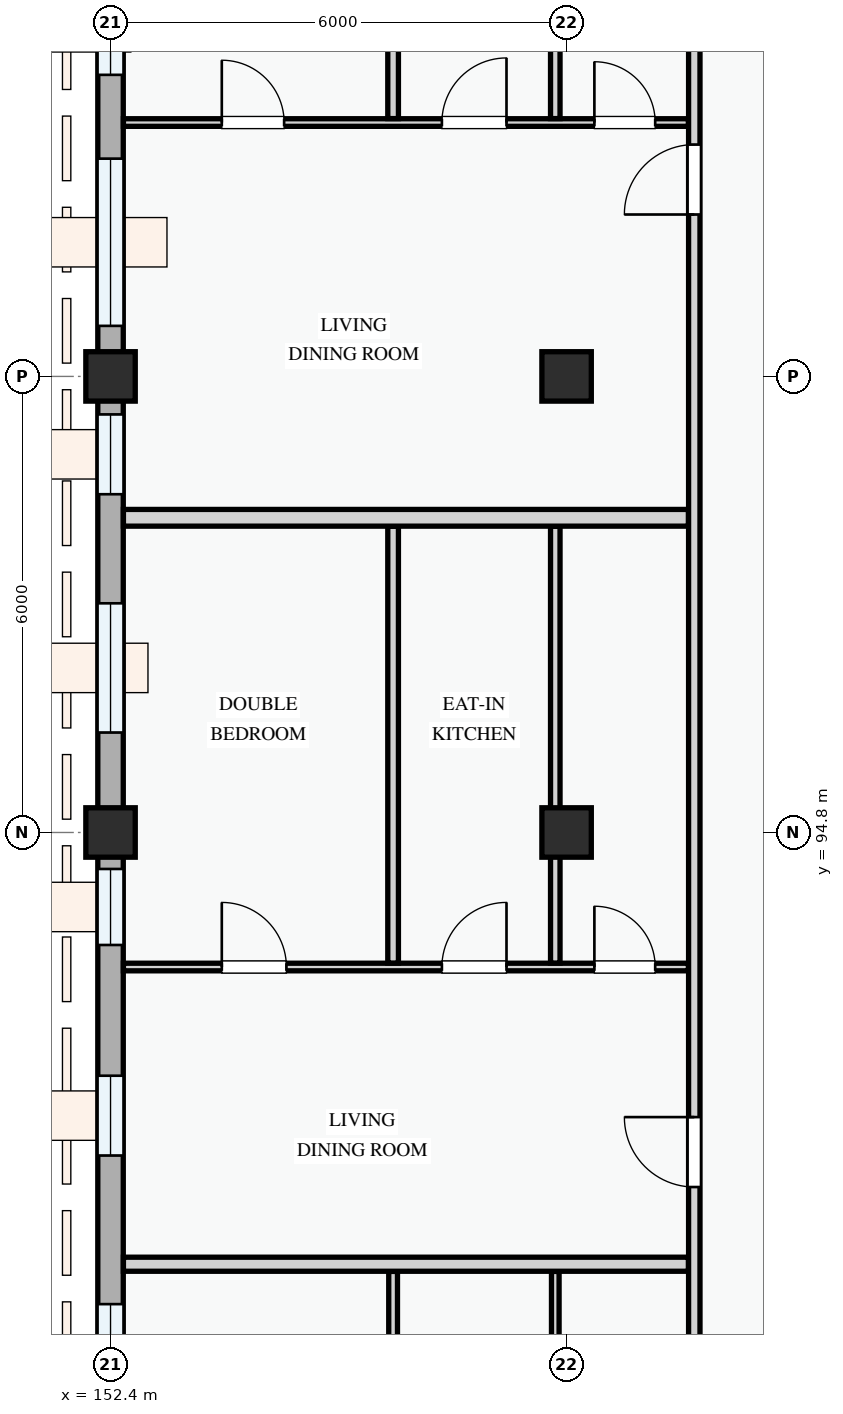
"""IFC4 building model, lengths in metres.
Left out: names, types, materials, properties, quantities, classifications, styles, units other than length and angle.
Written with IfcOpenShell. Run it as: python <this file> out.ifc"""

import sys

from ifc_helpers import new_model, si_unit, direction, frame, frame_2d, origin, origin_2d, place, context, subcontext, project, spatial, rectangle, extrude, element, fill, save


model = new_model("IFC4")
c1 = context("Model", 3, precision=1e-05, world=origin(), true_north=direction((0.0, 1.0)))
c2 = subcontext(c1, "Body", "Model", "MODEL_VIEW")
j1 = project(units=[si_unit("LENGTHUNIT", "METRE"), si_unit("PLANEANGLEUNIT", "RADIAN")], contexts=[c1])
p1 = place(None, origin())
s1 = spatial("IfcSite", under=j1, at=p1, CompositionType="ELEMENT")
p2 = place(p1, origin())
s2 = spatial("IfcBuilding", under=s1, at=p2, CompositionType="ELEMENT")
p3 = place(p2, frame((0.0, 0.0, 14.7)))
s3 = spatial("IfcBuildingStorey", under=s2, at=p3, CompositionType="ELEMENT", Elevation=14.7)
for number, where, z_axis, x_axis in (
    (1, (152.4, 94.8, 0.0), (0.0, 0.0, 1.0), (1.0, 0.0, 0.0)),
    (2, (152.4, 100.8, 0.0), (0.0, 0.0, 1.0), (1.0, 0.0, 0.0)),
    (3, (158.4, 94.8, 0.0), (0.0, 0.0, 1.0), (1.0, 0.0, 0.0)),
    (4, (158.4, 100.8, 0.0), (0.0, 0.0, 1.0), (1.0, 0.0, 0.0)),
):
    element("IfcColumn", number, at=place(p3, frame(where, z_axis=z_axis, x_axis=x_axis)), inside=s3, PredefinedType="COLUMN", context=c2, shape_type="SweptSolid", body=[
        extrude(rectangle(XDim=0.65, YDim=0.65, at=origin_2d()), origin(), (0.0, 0.0, 1.0), 3.3),
    ])
p4 = place(p3, frame((152.4, 109.2, 0.0), z_axis=(0.0, 0.0, 1.0), x_axis=(0.0, -1.0, 0.0)))
e5 = element("IfcWall", 5, at=p4, inside=s3, PredefinedType="STANDARD", context=c2, shape_type="SweptSolid", body=[
    extrude(rectangle(XDim=8.4, YDim=0.335, at=frame_2d((4.2, 0.0))), origin(), (0.0, 0.0, 1.0), 2.425),
])
p5 = place(p4, frame((0.667, 0.0, 0.78)))
e6 = element("IfcOpeningElement", 6, at=p5, cuts=e5, PredefinedType="OPENING", context=c2, shape_type="SweptSolid", body=[
    extrude(rectangle(XDim=1.55, YDim=1.4, at=frame_2d((0.775, 0.7))), frame((0.0, 0.177, 0.0), z_axis=(0.0, -1.0, 0.0), x_axis=(1.0, 0.0, 0.0)), (0.0, 0.0, 1.0), 0.355),
])
p6 = place(p4, frame((3.183, 0.0, 0.78)))
e7 = element("IfcOpeningElement", 7, at=p6, cuts=e5, PredefinedType="OPENING", context=c2, shape_type="SweptSolid", body=[
    extrude(rectangle(XDim=1.25, YDim=1.3, at=frame_2d((0.625, 0.65))), frame((0.0, 0.177, 0.0), z_axis=(0.0, -1.0, 0.0), x_axis=(1.0, 0.0, 0.0)), (0.0, 0.0, 1.0), 0.355),
])
p7 = place(p4, frame((5.535, 0.0, 0.78)))
e8 = element("IfcOpeningElement", 8, at=p7, cuts=e5, PredefinedType="OPENING", context=c2, shape_type="SweptSolid", body=[
    extrude(rectangle(XDim=2.2, YDim=1.5, at=frame_2d((1.1, 0.75))), frame((0.0, 0.177, 0.0), z_axis=(0.0, -1.0, 0.0), x_axis=(1.0, 0.0, 0.0)), (0.0, 0.0, 1.0), 0.355),
])
p8 = place(p3, frame((152.4, 100.8, 0.0), z_axis=(0.0, 0.0, 1.0), x_axis=(0.0, -1.0, 0.0)))
e9 = element("IfcWall", 9, at=p8, inside=s3, PredefinedType="STANDARD", context=c2, shape_type="SweptSolid", body=[
    extrude(rectangle(XDim=6.0, YDim=0.335, at=frame_2d((3.0, 0.0))), origin(), (0.0, 0.0, 1.0), 2.575),
])
p9 = place(p8, frame((0.5, 0.0, 0.78)))
e10 = element("IfcOpeningElement", 10, at=p9, cuts=e9, PredefinedType="OPENING", context=c2, shape_type="SweptSolid", body=[
    extrude(rectangle(XDim=1.05, YDim=1.2, at=frame_2d((0.525, 0.6))), frame((0.0, 0.177, 0.0), z_axis=(0.0, -1.0, 0.0), x_axis=(1.0, 0.0, 0.0)), (0.0, 0.0, 1.0), 0.355),
])
p10 = place(p8, frame((2.985, 0.0, 0.78)))
e11 = element("IfcOpeningElement", 11, at=p10, cuts=e9, PredefinedType="OPENING", context=c2, shape_type="SweptSolid", body=[
    extrude(rectangle(XDim=1.7, YDim=1.6, at=frame_2d((0.85, 0.8))), frame((0.0, 0.177, 0.0), z_axis=(0.0, -1.0, 0.0), x_axis=(1.0, 0.0, 0.0)), (0.0, 0.0, 1.0), 0.355),
])
p11 = place(p3, frame((152.4, 94.8, 0.0), z_axis=(0.0, 0.0, 1.0), x_axis=(0.0, -1.0, 0.0)))
e12 = element("IfcWall", 12, at=p11, inside=s3, PredefinedType="STANDARD", context=c2, shape_type="SweptSolid", body=[
    extrude(rectangle(XDim=8.4, YDim=0.335, at=frame_2d((4.2, 0.0))), origin(), (0.0, 0.0, 1.0), 2.425),
])
p12 = place(p11, frame((0.48, 0.0, 0.78)))
e13 = element("IfcOpeningElement", 13, at=p12, cuts=e12, PredefinedType="OPENING", context=c2, shape_type="SweptSolid", body=[
    extrude(rectangle(XDim=1.0, YDim=1.25, at=frame_2d((0.5, 0.625))), frame((0.0, 0.177, 0.0), z_axis=(0.0, -1.0, 0.0), x_axis=(1.0, 0.0, 0.0)), (0.0, 0.0, 1.0), 0.355),
])
p13 = place(p11, frame((3.2, 0.0, 0.78)))
e14 = element("IfcOpeningElement", 14, at=p13, cuts=e12, PredefinedType="OPENING", context=c2, shape_type="SweptSolid", body=[
    extrude(rectangle(XDim=1.05, YDim=1.2, at=frame_2d((0.525, 0.6))), frame((0.0, 0.177, 0.0), z_axis=(0.0, -1.0, 0.0), x_axis=(1.0, 0.0, 0.0)), (0.0, 0.0, 1.0), 0.355),
])
p14 = place(p11, frame((6.205, 0.0, 0.78)))
e15 = element("IfcOpeningElement", 15, at=p14, cuts=e12, PredefinedType="OPENING", context=c2, shape_type="SweptSolid", body=[
    extrude(rectangle(XDim=1.48, YDim=1.52, at=frame_2d((0.74, 0.76))), frame((0.0, 0.177, 0.0), z_axis=(0.0, -1.0, 0.0), x_axis=(1.0, 0.0, 0.0)), (0.0, 0.0, 1.0), 0.355),
])
p15 = place(p3, frame((156.118, 84.655, 0.0), z_axis=(0.0, 0.0, 1.0), x_axis=(0.0, 1.0, 0.0)))
e16 = element("IfcWall", 16, at=p15, inside=s3, PredefinedType="PARTITIONING", context=c2, shape_type="SweptSolid", body=[
    extrude(rectangle(XDim=4.371, YDim=0.115, at=frame_2d((2.186, 0.0))), origin(), (0.0, 0.0, 1.0), 3.0),
])
p16 = place(p3, frame((158.251, 84.655, 0.0), z_axis=(0.0, 0.0, 1.0), x_axis=(0.0, 1.0, 0.0)))
e17 = element("IfcWall", 17, at=p16, inside=s3, PredefinedType="PARTITIONING", context=c2, shape_type="SweptSolid", body=[
    extrude(rectangle(XDim=4.371, YDim=0.1, at=frame_2d((2.186, 0.0))), origin(), (0.0, 0.0, 1.0), 2.425),
])
p17 = place(p3, frame((152.57, 93.03, 0.0), z_axis=(0.0, 0.0, 1.0), x_axis=(1.0, 0.0, 0.0)))
e18 = element("IfcWall", 18, at=p17, inside=s3, PredefinedType="PARTITIONING", context=c2, shape_type="SweptSolid", body=[
    extrude(rectangle(XDim=7.433, YDim=0.1, at=frame_2d((3.717, 0.0))), origin(), (0.0, 0.0, 1.0), 3.0),
])
p18 = place(p17, frame((1.294, 0.0, 0.0)))
e19 = element("IfcOpeningElement", 19, at=p18, cuts=e18, PredefinedType="OPENING", context=c2, shape_type="SweptSolid", body=[
    extrude(rectangle(XDim=0.85, YDim=2.1, at=frame_2d((0.425, 1.05))), frame((0.0, 0.06, 0.0), z_axis=(0.0, -1.0, 0.0), x_axis=(1.0, 0.0, 0.0)), (0.0, 0.0, 1.0), 0.12),
])
p19 = place(p17, frame((4.19, 0.0, 0.0)))
e20 = element("IfcOpeningElement", 20, at=p19, cuts=e18, PredefinedType="OPENING", context=c2, shape_type="SweptSolid", body=[
    extrude(rectangle(XDim=0.85, YDim=2.1, at=frame_2d((0.425, 1.05))), frame((0.0, 0.06, 0.0), z_axis=(0.0, -1.0, 0.0), x_axis=(1.0, 0.0, 0.0)), (0.0, 0.0, 1.0), 0.12),
])
p20 = place(p17, frame((6.196, 0.0, 0.0)))
e21 = element("IfcOpeningElement", 21, at=p20, cuts=e18, PredefinedType="OPENING", context=c2, shape_type="SweptSolid", body=[
    extrude(rectangle(XDim=0.8, YDim=2.1, at=frame_2d((0.4, 1.05))), frame((0.0, 0.06, 0.0), z_axis=(0.0, -1.0, 0.0), x_axis=(1.0, 0.0, 0.0)), (0.0, 0.0, 1.0), 0.12),
])
p21 = place(p3, frame((156.118, 93.082, 0.0), z_axis=(0.0, 0.0, 1.0), x_axis=(0.0, 1.0, 0.0)))
e22 = element("IfcWall", 22, at=p21, inside=s3, PredefinedType="PARTITIONING", context=c2, shape_type="SweptSolid", body=[
    extrude(rectangle(XDim=5.746, YDim=0.14, at=frame_2d((2.873, 0.0))), origin(), (0.0, 0.0, 1.0), 3.0),
])
p22 = place(p3, frame((158.251, 93.082, 0.0), z_axis=(0.0, 0.0, 1.0), x_axis=(0.0, 1.0, 0.0)))
e23 = element("IfcWall", 23, at=p22, inside=s3, PredefinedType="PARTITIONING", context=c2, shape_type="SweptSolid", body=[
    extrude(rectangle(XDim=5.746, YDim=0.125, at=frame_2d((2.873, 0.0))), origin(), (0.0, 0.0, 1.0), 2.425),
])
p23 = place(p3, frame((152.57, 89.12, 0.0), z_axis=(0.0, 0.0, 1.0), x_axis=(1.0, 0.0, 0.0)))
e24 = element("IfcWall", 24, at=p23, inside=s3, PredefinedType="PARTITIONING", context=c2, shape_type="SweptSolid", body=[
    extrude(rectangle(XDim=7.433, YDim=0.185, at=frame_2d((3.717, 0.0))), origin(), (0.0, 0.0, 1.0), 3.0),
])
p24 = place(p3, frame((152.57, 104.14, 0.0), z_axis=(0.0, 0.0, 1.0), x_axis=(1.0, 0.0, 0.0)))
e25 = element("IfcWall", 25, at=p24, inside=s3, PredefinedType="PARTITIONING", context=c2, shape_type="SweptSolid", body=[
    extrude(rectangle(XDim=7.433, YDim=0.1, at=frame_2d((3.717, 0.0))), origin(), (0.0, 0.0, 1.0), 3.0),
])
p25 = place(p24, frame((1.294, 0.0, 0.0)))
e26 = element("IfcOpeningElement", 26, at=p25, cuts=e25, PredefinedType="OPENING", context=c2, shape_type="SweptSolid", body=[
    extrude(rectangle(XDim=0.82, YDim=2.08, at=frame_2d((0.41, 1.04))), frame((0.0, 0.06, 0.0), z_axis=(0.0, -1.0, 0.0), x_axis=(1.0, 0.0, 0.0)), (0.0, 0.0, 1.0), 0.12),
])
p26 = place(p24, frame((4.19, 0.0, 0.0)))
e27 = element("IfcOpeningElement", 27, at=p26, cuts=e25, PredefinedType="OPENING", context=c2, shape_type="SweptSolid", body=[
    extrude(rectangle(XDim=0.85, YDim=2.1, at=frame_2d((0.425, 1.05))), frame((0.0, 0.06, 0.0), z_axis=(0.0, -1.0, 0.0), x_axis=(1.0, 0.0, 0.0)), (0.0, 0.0, 1.0), 0.12),
])
p27 = place(p24, frame((6.196, 0.0, 0.0)))
e28 = element("IfcOpeningElement", 28, at=p27, cuts=e25, PredefinedType="OPENING", context=c2, shape_type="SweptSolid", body=[
    extrude(rectangle(XDim=0.8, YDim=2.1, at=frame_2d((0.4, 1.05))), frame((0.0, 0.06, 0.0), z_axis=(0.0, -1.0, 0.0), x_axis=(1.0, 0.0, 0.0)), (0.0, 0.0, 1.0), 0.12),
])
p28 = place(p3, frame((156.118, 104.192, 0.0), z_axis=(0.0, 0.0, 1.0), x_axis=(0.0, 1.0, 0.0)))
e29 = element("IfcWall", 29, at=p28, inside=s3, PredefinedType="PARTITIONING", context=c2, shape_type="SweptSolid", body=[
    extrude(rectangle(XDim=5.046, YDim=0.14, at=frame_2d((2.523, 0.0))), origin(), (0.0, 0.0, 1.0), 3.0),
])
p29 = place(p3, frame((158.251, 104.192, 0.0), z_axis=(0.0, 0.0, 1.0), x_axis=(0.0, 1.0, 0.0)))
e30 = element("IfcWall", 30, at=p29, inside=s3, PredefinedType="PARTITIONING", context=c2, shape_type="SweptSolid", body=[
    extrude(rectangle(XDim=5.046, YDim=0.125, at=frame_2d((2.523, 0.0))), origin(), (0.0, 0.0, 1.0), 2.425),
])
p30 = place(p3, frame((152.57, 98.94, 0.0), z_axis=(0.0, 0.0, 1.0), x_axis=(1.0, 0.0, 0.0)))
e31 = element("IfcWall", 31, at=p30, inside=s3, PredefinedType="PARTITIONING", context=c2, shape_type="SweptSolid", body=[
    extrude(rectangle(XDim=7.433, YDim=0.22, at=frame_2d((3.717, 0.0))), origin(), (0.0, 0.0, 1.0), 3.0),
])
p31 = place(p3, frame((160.08, 80.57, 0.0), z_axis=(0.0, 0.0, 1.0), x_axis=(0.0, 1.0, 0.0)))
e32 = element("IfcWall", 32, at=p31, inside=s3, PredefinedType="PARTITIONING", context=c2, shape_type="SweptSolid", body=[
    extrude(rectangle(XDim=28.771, YDim=0.15, at=frame_2d((14.385, 0.0))), origin(), (0.0, 0.0, 1.0), 3.0),
])
p32 = place(p31, frame((2.31, 0.0, 0.0)))
e33 = element("IfcOpeningElement", 33, at=p32, cuts=e32, PredefinedType="OPENING", context=c2, shape_type="SweptSolid", body=[
    extrude(rectangle(XDim=0.92, YDim=2.1, at=frame_2d((0.46, 1.05))), frame((0.0, 0.085, 0.0), z_axis=(0.0, -1.0, 0.0), x_axis=(1.0, 0.0, 0.0)), (0.0, 0.0, 1.0), 0.17),
])
p33 = place(p31, frame((9.566, 0.0, 0.0)))
e34 = element("IfcOpeningElement", 34, at=p33, cuts=e32, PredefinedType="OPENING", context=c2, shape_type="SweptSolid", body=[
    extrude(rectangle(XDim=0.92, YDim=2.1, at=frame_2d((0.46, 1.05))), frame((0.0, 0.085, 0.0), z_axis=(0.0, -1.0, 0.0), x_axis=(1.0, 0.0, 0.0)), (0.0, 0.0, 1.0), 0.17),
])
p34 = place(p31, frame((22.361, 0.0, 0.0)))
e35 = element("IfcOpeningElement", 35, at=p34, cuts=e32, PredefinedType="OPENING", context=c2, shape_type="SweptSolid", body=[
    extrude(rectangle(XDim=0.92, YDim=2.1, at=frame_2d((0.46, 1.05))), frame((0.0, 0.085, 0.0), z_axis=(0.0, -1.0, 0.0), x_axis=(1.0, 0.0, 0.0)), (0.0, 0.0, 1.0), 0.17),
])
p35 = place(p6, origin())
e36 = element("IfcWindow", 36, at=p35, inside=s3, PartitioningType="SINGLE_PANEL", PredefinedType="WINDOW", context=c2, shape_type="SweptSolid", body=[
    extrude(rectangle(XDim=1.25, YDim=1.3, at=frame_2d((0.625, 0.65))), frame((0.0, 0.03, 0.0), z_axis=(0.0, -1.0, 0.0), x_axis=(1.0, 0.0, 0.0)), (0.0, 0.0, 1.0), 0.06),
])
fill(e7, e36)
p36 = place(p7, origin())
e37 = element("IfcWindow", 37, at=p36, inside=s3, PartitioningType="DOUBLE_PANEL_VERTICAL", PredefinedType="WINDOW", context=c2, shape_type="SweptSolid", body=[
    extrude(rectangle(XDim=2.2, YDim=1.5, at=frame_2d((1.1, 0.75))), frame((0.0, 0.03, 0.0), z_axis=(0.0, -1.0, 0.0), x_axis=(1.0, 0.0, 0.0)), (0.0, 0.0, 1.0), 0.06),
])
fill(e8, e37)
p37 = place(p9, origin())
e38 = element("IfcWindow", 38, at=p37, inside=s3, PartitioningType="SINGLE_PANEL", PredefinedType="WINDOW", context=c2, shape_type="SweptSolid", body=[
    extrude(rectangle(XDim=1.05, YDim=1.2, at=frame_2d((0.525, 0.6))), frame((0.0, 0.03, 0.0), z_axis=(0.0, -1.0, 0.0), x_axis=(1.0, 0.0, 0.0)), (0.0, 0.0, 1.0), 0.06),
])
fill(e10, e38)
p38 = place(p10, origin())
e39 = element("IfcWindow", 39, at=p38, inside=s3, PartitioningType="DOUBLE_PANEL_VERTICAL", PredefinedType="WINDOW", context=c2, shape_type="SweptSolid", body=[
    extrude(rectangle(XDim=1.7, YDim=1.6, at=frame_2d((0.85, 0.8))), frame((0.0, 0.03, 0.0), z_axis=(0.0, -1.0, 0.0), x_axis=(1.0, 0.0, 0.0)), (0.0, 0.0, 1.0), 0.06),
])
fill(e11, e39)
p39 = place(p12, origin())
e40 = element("IfcWindow", 40, at=p39, inside=s3, PartitioningType="SINGLE_PANEL", PredefinedType="WINDOW", context=c2, shape_type="SweptSolid", body=[
    extrude(rectangle(XDim=1.0, YDim=1.25, at=frame_2d((0.5, 0.625))), frame((0.0, 0.03, 0.0), z_axis=(0.0, -1.0, 0.0), x_axis=(1.0, 0.0, 0.0)), (0.0, 0.0, 1.0), 0.06),
])
fill(e13, e40)
p40 = place(p13, origin())
e41 = element("IfcWindow", 41, at=p40, inside=s3, PartitioningType="SINGLE_PANEL", PredefinedType="WINDOW", context=c2, shape_type="SweptSolid", body=[
    extrude(rectangle(XDim=1.05, YDim=1.2, at=frame_2d((0.525, 0.6))), frame((0.0, 0.03, 0.0), z_axis=(0.0, -1.0, 0.0), x_axis=(1.0, 0.0, 0.0)), (0.0, 0.0, 1.0), 0.06),
])
fill(e14, e41)
p41 = place(p14, origin())
e42 = element("IfcWindow", 42, at=p41, inside=s3, PartitioningType="SINGLE_PANEL", PredefinedType="WINDOW", context=c2, shape_type="SweptSolid", body=[
    extrude(rectangle(XDim=1.48, YDim=1.52, at=frame_2d((0.74, 0.76))), frame((0.0, 0.03, 0.0), z_axis=(0.0, -1.0, 0.0), x_axis=(1.0, 0.0, 0.0)), (0.0, 0.0, 1.0), 0.06),
])
fill(e15, e42)
p42 = place(p18, origin())
e43 = element("IfcDoor", 43, at=p42, inside=s3, OperationType="SINGLE_SWING_LEFT", PredefinedType="DOOR", context=c2, shape_type="SweptSolid", body=[
    extrude(rectangle(XDim=0.85, YDim=2.1, at=frame_2d((0.425, 1.05))), frame((0.0, 0.025, 0.0), z_axis=(0.0, -1.0, 0.0), x_axis=(1.0, 0.0, 0.0)), (0.0, 0.0, 1.0), 0.05),
])
fill(e19, e43)
p43 = place(p19, origin())
e44 = element("IfcDoor", 44, at=p43, inside=s3, OperationType="SINGLE_SWING_RIGHT", PredefinedType="DOOR", context=c2, shape_type="SweptSolid", body=[
    extrude(rectangle(XDim=0.85, YDim=2.1, at=frame_2d((0.425, 1.05))), frame((0.0, 0.025, 0.0), z_axis=(0.0, -1.0, 0.0), x_axis=(1.0, 0.0, 0.0)), (0.0, 0.0, 1.0), 0.05),
])
fill(e20, e44)
p44 = place(p20, origin())
e45 = element("IfcDoor", 45, at=p44, inside=s3, OperationType="SINGLE_SWING_LEFT", PredefinedType="DOOR", context=c2, shape_type="SweptSolid", body=[
    extrude(rectangle(XDim=0.8, YDim=2.1, at=frame_2d((0.4, 1.05))), frame((0.0, 0.025, 0.0), z_axis=(0.0, -1.0, 0.0), x_axis=(1.0, 0.0, 0.0)), (0.0, 0.0, 1.0), 0.05),
])
fill(e21, e45)
p45 = place(p25, origin())
e46 = element("IfcDoor", 46, at=p45, inside=s3, OperationType="SINGLE_SWING_LEFT", PredefinedType="DOOR", context=c2, shape_type="SweptSolid", body=[
    extrude(rectangle(XDim=0.82, YDim=2.08, at=frame_2d((0.41, 1.04))), frame((0.0, 0.025, 0.0), z_axis=(0.0, -1.0, 0.0), x_axis=(1.0, 0.0, 0.0)), (0.0, 0.0, 1.0), 0.05),
])
fill(e26, e46)
p46 = place(p26, origin())
e47 = element("IfcDoor", 47, at=p46, inside=s3, OperationType="SINGLE_SWING_RIGHT", PredefinedType="DOOR", context=c2, shape_type="SweptSolid", body=[
    extrude(rectangle(XDim=0.85, YDim=2.1, at=frame_2d((0.425, 1.05))), frame((0.0, 0.025, 0.0), z_axis=(0.0, -1.0, 0.0), x_axis=(1.0, 0.0, 0.0)), (0.0, 0.0, 1.0), 0.05),
])
fill(e27, e47)
p47 = place(p27, origin())
e48 = element("IfcDoor", 48, at=p47, inside=s3, OperationType="SINGLE_SWING_LEFT", PredefinedType="DOOR", context=c2, shape_type="SweptSolid", body=[
    extrude(rectangle(XDim=0.8, YDim=2.1, at=frame_2d((0.4, 1.05))), frame((0.0, 0.025, 0.0), z_axis=(0.0, -1.0, 0.0), x_axis=(1.0, 0.0, 0.0)), (0.0, 0.0, 1.0), 0.05),
])
fill(e28, e48)
p48 = place(p33, origin())
e49 = element("IfcDoor", 49, at=p48, inside=s3, OperationType="SINGLE_SWING_RIGHT", PredefinedType="DOOR", context=c2, shape_type="SweptSolid", body=[
    extrude(rectangle(XDim=0.92, YDim=2.1, at=frame_2d((0.46, 1.05))), frame((0.0, 0.025, 0.0), z_axis=(0.0, -1.0, 0.0), x_axis=(1.0, 0.0, 0.0)), (0.0, 0.0, 1.0), 0.05),
])
fill(e34, e49)
p49 = place(p34, origin())
e50 = element("IfcDoor", 50, at=p49, inside=s3, OperationType="SINGLE_SWING_LEFT", PredefinedType="DOOR", context=c2, shape_type="SweptSolid", body=[
    extrude(rectangle(XDim=0.92, YDim=2.1, at=frame_2d((0.46, 1.05))), frame((0.0, 0.025, 0.0), z_axis=(0.0, -1.0, 0.0), x_axis=(1.0, 0.0, 0.0)), (0.0, 0.0, 1.0), 0.05),
])
fill(e35, e50)
save(model, sys.argv[1])
